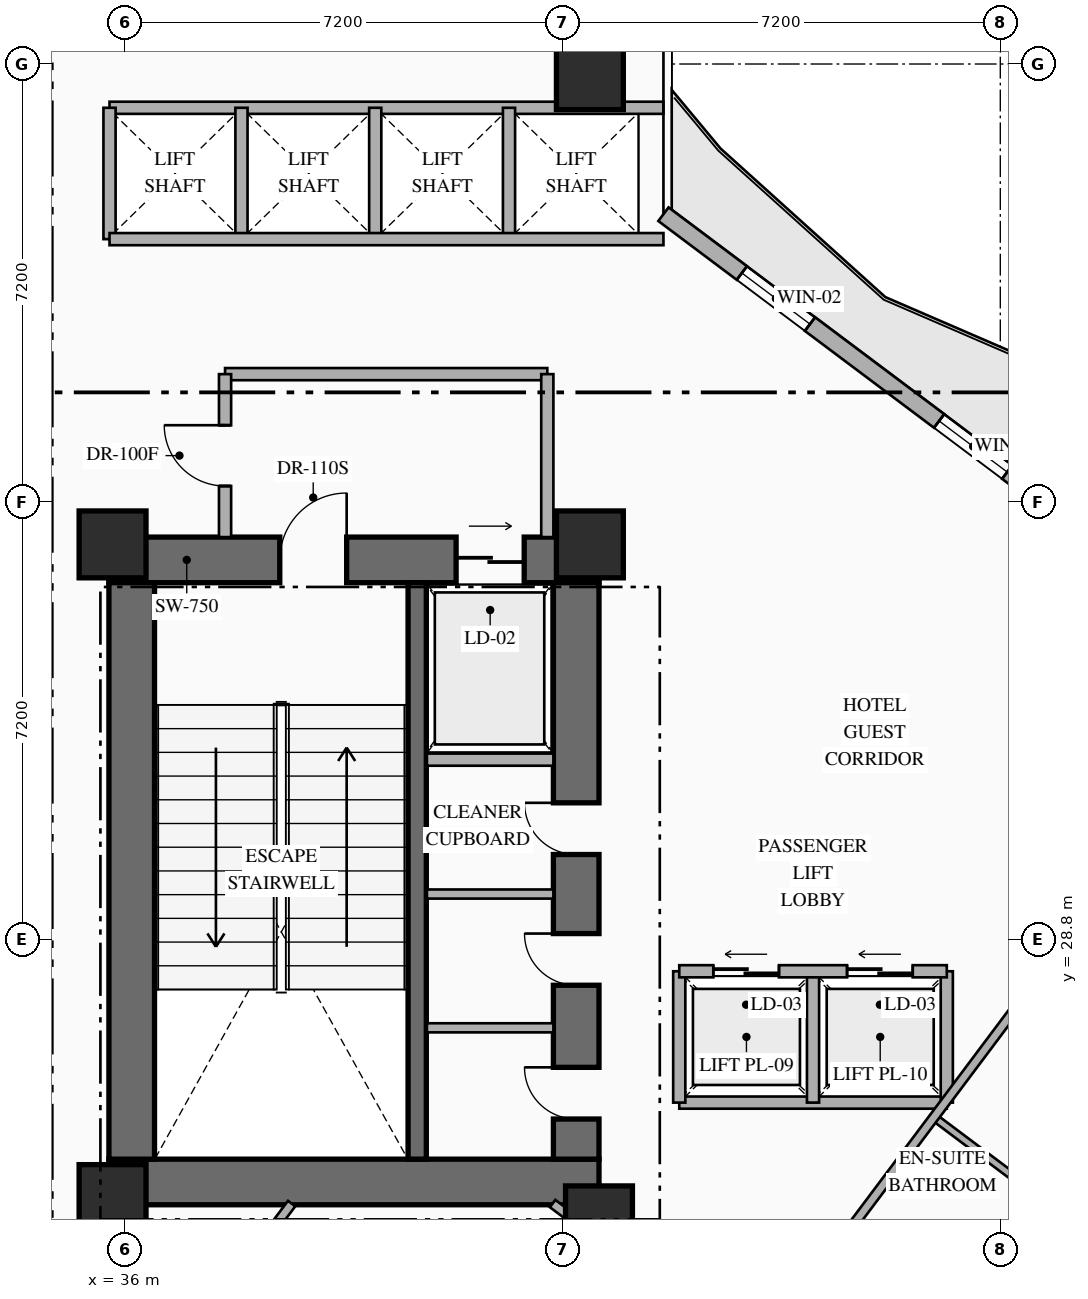
"""IFC4 building model, lengths in metres.
Left out: names, types, materials, properties, quantities, classifications, styles, units other than length and angle.
Written with IfcOpenShell. Run it as: python <this file> out.ifc"""

import sys

from ifc_helpers import new_model, si_unit, direction, frame, frame_2d, origin, origin_2d, place, context, subcontext, project, spatial, rectangle, extrude, element, fill, save


model = new_model("IFC4")
c1 = context("Model", 3, precision=1e-05, world=origin(), true_north=direction((0.0, 1.0)))
c2 = subcontext(c1, "Body", "Model", "MODEL_VIEW")
j1 = project(units=[si_unit("LENGTHUNIT", "METRE"), si_unit("PLANEANGLEUNIT", "RADIAN")], contexts=[c1])
p1 = place(None, origin())
s1 = spatial("IfcSite", under=j1, at=p1, CompositionType="ELEMENT")
p2 = place(p1, origin())
s2 = spatial("IfcBuilding", under=s1, at=p2, CompositionType="ELEMENT")
p3 = place(p2, frame((0.0, 0.0, 70.1)))
s3 = spatial("IfcBuildingStorey", under=s2, at=p3, CompositionType="ELEMENT", Elevation=70.1)
p4 = place(p3, frame((35.74, 24.815, 0.0), z_axis=(0.0, 0.0, 1.0), x_axis=(1.0, 0.0, 0.0)))
e1 = element("IfcWall", 1, at=p4, inside=s3, PredefinedType="SHEAR", context=c2, shape_type="SweptSolid", body=[
    extrude(rectangle(XDim=8.06, YDim=0.75, at=frame_2d((4.03, 0.0))), origin(), (0.0, 0.0, 1.0), 4.5),
])
p5 = place(p3, frame((35.74, 35.045, 0.0), z_axis=(0.0, 0.0, 1.0), x_axis=(1.0, 0.0, 0.0)))
e2 = element("IfcWall", 2, at=p5, inside=s3, PredefinedType="SHEAR", context=c2, shape_type="SweptSolid", body=[
    extrude(rectangle(XDim=8.06, YDim=0.75, at=frame_2d((4.03, 0.0))), origin(), (0.0, 0.0, 1.0), 4.5),
])
p6 = place(p5, frame((2.81, 0.0, 0.0)))
e3 = element("IfcOpeningElement", 3, at=p6, cuts=e2, PredefinedType="OPENING", context=c2, shape_type="SweptSolid", body=[
    extrude(rectangle(XDim=1.1, YDim=2.2, at=frame_2d((0.55, 1.1))), frame((0.0, 0.385, 0.0), z_axis=(0.0, -1.0, 0.0), x_axis=(1.0, 0.0, 0.0)), (0.0, 0.0, 1.0), 0.77),
])
p7 = place(p5, frame((5.71, 0.0, 0.0)))
e4 = element("IfcOpeningElement", 4, at=p7, cuts=e2, PredefinedType="OPENING", context=c2, shape_type="SweptSolid", body=[
    extrude(rectangle(XDim=1.12, YDim=2.15, at=frame_2d((0.56, 1.075))), frame((0.0, 0.385, 0.0), z_axis=(0.0, -1.0, 0.0), x_axis=(1.0, 0.0, 0.0)), (0.0, 0.0, 1.0), 0.77),
])
p8 = place(p3, frame((36.115, 25.19, 0.0), z_axis=(0.0, 0.0, 1.0), x_axis=(0.0, 1.0, 0.0)))
e5 = element("IfcWall", 5, at=p8, inside=s3, PredefinedType="SHEAR", context=c2, shape_type="SweptSolid", body=[
    extrude(rectangle(XDim=9.48, YDim=0.75, at=frame_2d((4.74, 0.0))), origin(), (0.0, 0.0, 1.0), 4.5),
])
p9 = place(p3, frame((43.425, 25.19, 0.0), z_axis=(0.0, 0.0, 1.0), x_axis=(0.0, 1.0, 0.0)))
e6 = element("IfcWall", 6, at=p9, inside=s3, PredefinedType="SHEAR", context=c2, shape_type="SweptSolid", body=[
    extrude(rectangle(XDim=9.48, YDim=0.75, at=frame_2d((4.74, 0.0))), origin(), (0.0, 0.0, 1.0), 4.5),
])
p10 = place(p9, frame((0.66, 0.0, 0.0)))
e7 = element("IfcOpeningElement", 7, at=p10, cuts=e6, PredefinedType="OPENING", context=c2, shape_type="SweptSolid", body=[
    extrude(rectangle(XDim=0.85, YDim=2.08, at=frame_2d((0.425, 1.04))), frame((0.0, 0.385, 0.0), z_axis=(0.0, -1.0, 0.0), x_axis=(1.0, 0.0, 0.0)), (0.0, 0.0, 1.0), 0.77),
])
p11 = place(p9, frame((2.86, 0.0, 0.0)))
e8 = element("IfcOpeningElement", 8, at=p11, cuts=e6, PredefinedType="OPENING", context=c2, shape_type="SweptSolid", body=[
    extrude(rectangle(XDim=0.85, YDim=2.08, at=frame_2d((0.425, 1.04))), frame((0.0, 0.385, 0.0), z_axis=(0.0, -1.0, 0.0), x_axis=(1.0, 0.0, 0.0)), (0.0, 0.0, 1.0), 0.77),
])
p12 = place(p9, frame((5.01, 0.0, 0.0)))
e9 = element("IfcOpeningElement", 9, at=p12, cuts=e6, PredefinedType="OPENING", context=c2, shape_type="SweptSolid", body=[
    extrude(rectangle(XDim=0.85, YDim=2.08, at=frame_2d((0.425, 1.04))), frame((0.0, 0.385, 0.0), z_axis=(0.0, -1.0, 0.0), x_axis=(1.0, 0.0, 0.0)), (0.0, 0.0, 1.0), 0.77),
])
p13 = place(p3, frame((40.81, 25.19, 0.0), z_axis=(0.0, 0.0, 1.0), x_axis=(0.0, 1.0, 0.0)))
e10 = element("IfcWall", 10, at=p13, inside=s3, PredefinedType="SHEAR", context=c2, shape_type="SweptSolid", body=[
    extrude(rectangle(XDim=9.48, YDim=0.3, at=frame_2d((4.74, 0.0))), origin(), (0.0, 0.0, 1.0), 4.5),
])
for number, where, z_axis, x_axis in (
    (11, (35.8, 24.55, 0.0), (0.0, 0.0, 1.0), (1.0, 0.0, 0.0)),
    (12, (43.8, 24.2, 0.0), (0.0, 0.0, 1.0), (1.0, 0.0, 0.0)),
    (13, (35.8, 35.3, 0.0), (0.0, 0.0, 1.0), (1.0, 0.0, 0.0)),
    (14, (43.65, 35.3, 0.0), (0.0, 0.0, 1.0), (1.0, 0.0, 0.0)),
    (15, (43.65, 43.0, 0.0), (0.0, 0.0, 1.0), (1.0, 0.0, 0.0)),
):
    element("IfcColumn", number, at=place(p3, frame(where, z_axis=z_axis, x_axis=x_axis)), inside=s3, PredefinedType="COLUMN", context=c2, shape_type="SweptSolid", body=[
        extrude(rectangle(XDim=1.1, YDim=1.1, at=origin_2d()), origin(), (0.0, 0.0, 1.0), 4.5),
    ])
p14 = place(p3, frame((44.86, 40.73, 0.0), z_axis=(0.0, 0.0, 1.0), x_axis=(0.800006902154, -0.599990797017, 0.0)))
e16 = element("IfcWall", 16, at=p14, inside=s3, PredefinedType="STANDARD", context=c2, shape_type="SweptSolid", body=[
    extrude(rectangle(XDim=29.712, YDim=0.28, at=frame_2d((14.856, 0.0))), origin(), (0.0, 0.0, 1.0), 4.28),
])
p15 = place(p14, frame((14.249, 0.0, 0.0)))
e17 = element("IfcOpeningElement", 17, at=p15, cuts=e16, PredefinedType="OPENING", context=c2, shape_type="SweptSolid", body=[
    extrude(rectangle(XDim=1.1, YDim=2.2, at=frame_2d((0.55, 1.1))), frame((0.0, 0.15, 0.0), z_axis=(0.0, -1.0, 0.0), x_axis=(1.0, 0.0, 0.0)), (0.0, 0.0, 1.0), 0.3),
])
p16 = place(p14, frame((1.612, 0.0, 0.85)))
e18 = element("IfcOpeningElement", 18, at=p16, cuts=e16, PredefinedType="OPENING", context=c2, shape_type="SweptSolid", body=[
    extrude(rectangle(XDim=1.4, YDim=1.8, at=frame_2d((0.7, 0.9))), frame((0.0, 0.15, 0.0), z_axis=(0.0, -1.0, 0.0), x_axis=(1.0, 0.0, 0.0)), (0.0, 0.0, 1.0), 0.3),
])
p17 = place(p14, frame((5.667, 0.0, 0.85)))
e19 = element("IfcOpeningElement", 19, at=p17, cuts=e16, PredefinedType="OPENING", context=c2, shape_type="SweptSolid", body=[
    extrude(rectangle(XDim=1.4, YDim=1.8, at=frame_2d((0.7, 0.9))), frame((0.0, 0.15, 0.0), z_axis=(0.0, -1.0, 0.0), x_axis=(1.0, 0.0, 0.0)), (0.0, 0.0, 1.0), 0.3),
])
p18 = place(p14, frame((9.912, 0.0, 0.85)))
e20 = element("IfcOpeningElement", 20, at=p18, cuts=e16, PredefinedType="OPENING", context=c2, shape_type="SweptSolid", body=[
    extrude(rectangle(XDim=1.4, YDim=1.8, at=frame_2d((0.7, 0.9))), frame((0.0, 0.15, 0.0), z_axis=(0.0, -1.0, 0.0), x_axis=(1.0, 0.0, 0.0)), (0.0, 0.0, 1.0), 0.3),
])
p19 = place(p14, frame((19.743, 0.0, 0.85)))
e21 = element("IfcOpeningElement", 21, at=p19, cuts=e16, PredefinedType="OPENING", context=c2, shape_type="SweptSolid", body=[
    extrude(rectangle(XDim=1.4, YDim=1.8, at=frame_2d((0.7, 0.9))), frame((0.0, 0.15, 0.0), z_axis=(0.0, -1.0, 0.0), x_axis=(1.0, 0.0, 0.0)), (0.0, 0.0, 1.0), 0.3),
])
p20 = place(p14, frame((22.645, 0.0, 0.85)))
e22 = element("IfcOpeningElement", 22, at=p20, cuts=e16, PredefinedType="OPENING", context=c2, shape_type="SweptSolid", body=[
    extrude(rectangle(XDim=1.4, YDim=1.8, at=frame_2d((0.7, 0.9))), frame((0.0, 0.15, 0.0), z_axis=(0.0, -1.0, 0.0), x_axis=(1.0, 0.0, 0.0)), (0.0, 0.0, 1.0), 0.3),
])
p21 = place(p14, frame((26.354, 0.0, 0.85)))
e23 = element("IfcOpeningElement", 23, at=p21, cuts=e16, PredefinedType="OPENING", context=c2, shape_type="SweptSolid", body=[
    extrude(rectangle(XDim=1.4, YDim=1.8, at=frame_2d((0.7, 0.9))), frame((0.0, 0.15, 0.0), z_axis=(0.0, -1.0, 0.0), x_axis=(1.0, 0.0, 0.0)), (0.0, 0.0, 1.0), 0.3),
])
p22 = place(p3, frame((40.97, 31.76, 0.0), z_axis=(0.0, 0.0, 1.0), x_axis=(1.0, 0.0, 0.0)))
e24 = element("IfcWall", 24, at=p22, inside=s3, PredefinedType="STANDARD", context=c2, shape_type="SweptSolid", body=[
    extrude(rectangle(XDim=2.08, YDim=0.2, at=frame_2d((1.04, 0.0))), origin(), (0.0, 0.0, 1.0), 4.28),
])
for number, where, z_axis, x_axis in (
    (25, (40.97, 27.35, 0.0), (0.0, 0.0, 1.0), (1.0, 0.0, 0.0)),
    (26, (40.97, 29.55, 0.0), (0.0, 0.0, 1.0), (1.0, 0.0, 0.0)),
):
    element("IfcWall", number, at=place(p3, frame(where, z_axis=z_axis, x_axis=x_axis)), inside=s3, PredefinedType="PARTITIONING", context=c2, shape_type="SweptSolid", body=[
        extrude(rectangle(XDim=2.08, YDim=0.15, at=frame_2d((1.04, 0.0))), origin(), (0.0, 0.0, 1.0), 4.28),
    ])
p23 = place(p3, frame((37.65, 38.1, 0.0), z_axis=(0.0, 0.0, 1.0), x_axis=(1.0, 0.0, 0.0)))
e27 = element("IfcWall", 27, at=p23, inside=s3, PredefinedType="STANDARD", context=c2, shape_type="SweptSolid", body=[
    extrude(rectangle(XDim=5.3, YDim=0.2, at=frame_2d((2.65, 0.0))), origin(), (0.0, 0.0, 1.0), 4.28),
])
p24 = place(p3, frame((42.95, 35.42, 0.0), z_axis=(0.0, 0.0, 1.0), x_axis=(0.0, 1.0, 0.0)))
e28 = element("IfcWall", 28, at=p24, inside=s3, PredefinedType="STANDARD", context=c2, shape_type="SweptSolid", body=[
    extrude(rectangle(XDim=2.68, YDim=0.2, at=frame_2d((1.34, 0.0))), origin(), (0.0, 0.0, 1.0), 4.28),
])
p25 = place(p3, frame((37.65, 35.42, 0.0), z_axis=(0.0, 0.0, 1.0), x_axis=(0.0, 1.0, 0.0)))
e29 = element("IfcWall", 29, at=p25, inside=s3, PredefinedType="STANDARD", context=c2, shape_type="SweptSolid", body=[
    extrude(rectangle(XDim=2.68, YDim=0.2, at=frame_2d((1.34, 0.0))), origin(), (0.0, 0.0, 1.0), 4.28),
])
p26 = place(p25, frame((0.84, 0.0, 0.0)))
e30 = element("IfcOpeningElement", 30, at=p26, cuts=e29, PredefinedType="OPENING", context=c2, shape_type="SweptSolid", body=[
    extrude(rectangle(XDim=1.0, YDim=2.2, at=frame_2d((0.5, 1.1))), frame((0.0, 0.11, 0.0), z_axis=(0.0, -1.0, 0.0), x_axis=(1.0, 0.0, 0.0)), (0.0, 0.0, 1.0), 0.22),
])
p27 = place(p3, frame((35.75, 42.48, 0.0), z_axis=(0.0, 0.0, 1.0), x_axis=(1.0, 0.0, 0.0)))
e31 = element("IfcWall", 31, at=p27, inside=s3, PredefinedType="STANDARD", context=c2, shape_type="SweptSolid", body=[
    extrude(rectangle(XDim=9.11, YDim=0.2, at=frame_2d((4.555, 0.0))), origin(), (0.0, 0.0, 1.0), 4.28),
])
for number, where, z_axis, x_axis in (
    (32, (35.75, 40.32, 0.0), (0.0, 0.0, 1.0), (0.0, 1.0, 0.0)),
    (33, (37.92, 40.32, 0.0), (0.0, 0.0, 1.0), (0.0, 1.0, 0.0)),
    (34, (40.12, 40.32, 0.0), (0.0, 0.0, 1.0), (0.0, 1.0, 0.0)),
    (35, (42.32, 40.32, 0.0), (0.0, 0.0, 1.0), (0.0, 1.0, 0.0)),
):
    element("IfcWall", number, at=place(p3, frame(where, z_axis=z_axis, x_axis=x_axis)), inside=s3, PredefinedType="STANDARD", context=c2, shape_type="SweptSolid", body=[
        extrude(rectangle(XDim=2.16, YDim=0.2, at=frame_2d((1.08, 0.0))), origin(), (0.0, 0.0, 1.0), 4.28),
    ])
p28 = place(p3, frame((35.75, 40.32, 0.0), z_axis=(0.0, 0.0, 1.0), x_axis=(1.0, 0.0, 0.0)))
e36 = element("IfcWall", 36, at=p28, inside=s3, PredefinedType="STANDARD", context=c2, shape_type="SweptSolid", body=[
    extrude(rectangle(XDim=9.11, YDim=0.2, at=frame_2d((4.555, 0.0))), origin(), (0.0, 0.0, 1.0), 4.28),
])
p29 = place(p3, frame((45.12, 26.12, 0.0), z_axis=(0.0, 0.0, 1.0), x_axis=(1.0, 0.0, 0.0)))
e37 = element("IfcWall", 37, at=p29, inside=s3, PredefinedType="STANDARD", context=c2, shape_type="SweptSolid", body=[
    extrude(rectangle(XDim=4.4, YDim=0.2, at=frame_2d((2.2, 0.0))), origin(), (0.0, 0.0, 1.0), 4.28),
])
for number, where, z_axis, x_axis in (
    (38, (45.12, 26.12, 0.0), (0.0, 0.0, 1.0), (0.0, 1.0, 0.0)),
    (39, (49.52, 26.12, 0.0), (0.0, 0.0, 1.0), (0.0, 1.0, 0.0)),
    (40, (47.32, 26.12, 0.0), (0.0, 0.0, 1.0), (0.0, 1.0, 0.0)),
):
    element("IfcWall", number, at=place(p3, frame(where, z_axis=z_axis, x_axis=x_axis)), inside=s3, PredefinedType="STANDARD", context=c2, shape_type="SweptSolid", body=[
        extrude(rectangle(XDim=2.16, YDim=0.2, at=frame_2d((1.08, 0.0))), origin(), (0.0, 0.0, 1.0), 4.28),
    ])
p30 = place(p3, frame((45.12, 28.28, 0.0), z_axis=(0.0, 0.0, 1.0), x_axis=(1.0, 0.0, 0.0)))
e41 = element("IfcWall", 41, at=p30, inside=s3, PredefinedType="STANDARD", context=c2, shape_type="SweptSolid", body=[
    extrude(rectangle(XDim=4.4, YDim=0.2, at=frame_2d((2.2, 0.0))), origin(), (0.0, 0.0, 1.0), 4.28),
])
p31 = place(p30, frame((0.56, 0.0, 0.0)))
e42 = element("IfcOpeningElement", 42, at=p31, cuts=e41, PredefinedType="OPENING", context=c2, shape_type="SweptSolid", body=[
    extrude(rectangle(XDim=1.08, YDim=2.15, at=frame_2d((0.54, 1.075))), frame((0.0, 0.11, 0.0), z_axis=(0.0, -1.0, 0.0), x_axis=(1.0, 0.0, 0.0)), (0.0, 0.0, 1.0), 0.22),
])
p32 = place(p30, frame((2.76, 0.0, 0.0)))
e43 = element("IfcOpeningElement", 43, at=p32, cuts=e41, PredefinedType="OPENING", context=c2, shape_type="SweptSolid", body=[
    extrude(rectangle(XDim=1.08, YDim=2.15, at=frame_2d((0.54, 1.075))), frame((0.0, 0.11, 0.0), z_axis=(0.0, -1.0, 0.0), x_axis=(1.0, 0.0, 0.0)), (0.0, 0.0, 1.0), 0.22),
])
p33 = place(p3, frame((43.037, 24.46, 0.0), z_axis=(0.0, 0.0, 1.0), x_axis=(0.799971872363, -0.600037501685, 0.0)))
e44 = element("IfcWall", 44, at=p33, inside=s3, PredefinedType="PARTITIONING", context=c2, shape_type="SweptSolid", body=[
    extrude(rectangle(XDim=4.167, YDim=0.15, at=frame_2d((2.083, 0.0))), origin(), (0.0, 0.0, 1.0), 3.475),
])
p34 = place(p33, frame((2.468, 0.0, 0.0)))
e45 = element("IfcOpeningElement", 45, at=p34, cuts=e44, PredefinedType="OPENING", context=c2, shape_type="SweptSolid", body=[
    extrude(rectangle(XDim=0.95, YDim=2.15, at=frame_2d((0.475, 1.075))), frame((0.0, 0.085, 0.0), z_axis=(0.0, -1.0, 0.0), x_axis=(1.0, 0.0, 0.0)), (0.0, 0.0, 1.0), 0.17),
])
p35 = place(p3, frame((33.384, 17.312, 0.0), z_axis=(0.0, 0.0, 1.0), x_axis=(0.600008743659, 0.799993442181, 0.0)))
e46 = element("IfcWall", 46, at=p35, inside=s3, PredefinedType="PARTITIONING", context=c2, shape_type="SweptSolid", body=[
    extrude(rectangle(XDim=8.935, YDim=0.15, at=frame_2d((4.468, 0.0))), origin(), (0.0, 0.0, 1.0), 4.28),
])
p36 = place(p3, frame((49.59, 22.67, 0.0), z_axis=(0.0, 0.0, 1.0), x_axis=(0.599951172744, 0.800036618114, 0.0)))
e47 = element("IfcWall", 47, at=p36, inside=s3, PredefinedType="PARTITIONING", context=c2, shape_type="SweptSolid", body=[
    extrude(rectangle(XDim=2.4, YDim=0.12, at=frame_2d((1.2, 0.0))), origin(), (0.0, 0.0, 1.0), 4.28),
])
p37 = place(p36, frame((0.8, 0.0, 0.0)))
e48 = element("IfcOpeningElement", 48, at=p37, cuts=e47, PredefinedType="OPENING", context=c2, shape_type="SweptSolid", body=[
    extrude(rectangle(XDim=0.8, YDim=2.06, at=frame_2d((0.4, 1.03))), frame((0.0, 0.07, 0.0), z_axis=(0.0, -1.0, 0.0), x_axis=(1.0, 0.0, 0.0)), (0.0, 0.0, 1.0), 0.14),
])
p38 = place(p3, frame((49.31, 25.88, 0.0), z_axis=(0.0, 0.0, 1.0), x_axis=(0.800040880289, -0.59994548908, 0.0)))
e49 = element("IfcWall", 49, at=p38, inside=s3, PredefinedType="PARTITIONING", context=c2, shape_type="SweptSolid", body=[
    extrude(rectangle(XDim=2.15, YDim=0.12, at=frame_2d((1.075, 0.0))), origin(), (0.0, 0.0, 1.0), 4.28),
])
p39 = place(p3, frame((47.87, 23.96, 0.0), z_axis=(0.0, 0.0, 1.0), x_axis=(0.599996617946, 0.80000253653, 0.0)))
e50 = element("IfcWall", 50, at=p39, inside=s3, PredefinedType="PARTITIONING", context=c2, shape_type="SweptSolid", body=[
    extrude(rectangle(XDim=11.55, YDim=0.15, at=frame_2d((5.775, 0.0))), origin(), (0.0, 0.0, 1.0), 4.28),
])
p40 = place(p16, origin())
e51 = element("IfcWindow", 51, at=p40, inside=s3, PartitioningType="SINGLE_PANEL", PredefinedType="WINDOW", context=c2, shape_type="SweptSolid", body=[
    extrude(rectangle(XDim=1.4, YDim=1.8, at=frame_2d((0.7, 0.9))), frame((0.0, 0.03, 0.0), z_axis=(0.0, -1.0, 0.0), x_axis=(1.0, 0.0, 0.0)), (0.0, 0.0, 1.0), 0.06),
])
fill(e18, e51)
p41 = place(p17, origin())
e52 = element("IfcWindow", 52, at=p41, inside=s3, PartitioningType="SINGLE_PANEL", PredefinedType="WINDOW", context=c2, shape_type="SweptSolid", body=[
    extrude(rectangle(XDim=1.4, YDim=1.8, at=frame_2d((0.7, 0.9))), frame((0.0, 0.03, 0.0), z_axis=(0.0, -1.0, 0.0), x_axis=(1.0, 0.0, 0.0)), (0.0, 0.0, 1.0), 0.06),
])
fill(e19, e52)
p42 = place(p6, origin())
e53 = element("IfcDoor", 53, at=p42, inside=s3, OperationType="SINGLE_SWING_RIGHT", PredefinedType="DOOR", context=c2, shape_type="SweptSolid", body=[
    extrude(rectangle(XDim=1.1, YDim=2.2, at=frame_2d((0.55, 1.1))), frame((0.0, 0.025, 0.0), z_axis=(0.0, -1.0, 0.0), x_axis=(1.0, 0.0, 0.0)), (0.0, 0.0, 1.0), 0.05),
])
fill(e3, e53)
p43 = place(p7, origin())
e54 = element("IfcDoor", 54, at=p43, inside=s3, OperationType="SLIDING_TO_RIGHT", PredefinedType="USERDEFINED", context=c2, shape_type="SweptSolid", body=[
    extrude(rectangle(XDim=1.12, YDim=2.15, at=frame_2d((0.56, 1.075))), frame((0.0, 0.025, 0.0), z_axis=(0.0, -1.0, 0.0), x_axis=(1.0, 0.0, 0.0)), (0.0, 0.0, 1.0), 0.05),
])
fill(e4, e54)
p44 = place(p10, origin())
e55 = element("IfcDoor", 55, at=p44, inside=s3, OperationType="SINGLE_SWING_RIGHT", PredefinedType="DOOR", context=c2, shape_type="SweptSolid", body=[
    extrude(rectangle(XDim=0.85, YDim=2.08, at=frame_2d((0.425, 1.04))), frame((0.0, 0.025, 0.0), z_axis=(0.0, -1.0, 0.0), x_axis=(1.0, 0.0, 0.0)), (0.0, 0.0, 1.0), 0.05),
])
fill(e7, e55)
p45 = place(p11, origin())
e56 = element("IfcDoor", 56, at=p45, inside=s3, OperationType="SINGLE_SWING_RIGHT", PredefinedType="DOOR", context=c2, shape_type="SweptSolid", body=[
    extrude(rectangle(XDim=0.85, YDim=2.08, at=frame_2d((0.425, 1.04))), frame((0.0, 0.025, 0.0), z_axis=(0.0, -1.0, 0.0), x_axis=(1.0, 0.0, 0.0)), (0.0, 0.0, 1.0), 0.05),
])
fill(e8, e56)
p46 = place(p12, origin())
e57 = element("IfcDoor", 57, at=p46, inside=s3, OperationType="SINGLE_SWING_RIGHT", PredefinedType="DOOR", context=c2, shape_type="SweptSolid", body=[
    extrude(rectangle(XDim=0.85, YDim=2.08, at=frame_2d((0.425, 1.04))), frame((0.0, 0.025, 0.0), z_axis=(0.0, -1.0, 0.0), x_axis=(1.0, 0.0, 0.0)), (0.0, 0.0, 1.0), 0.05),
])
fill(e9, e57)
p47 = place(p26, origin())
e58 = element("IfcDoor", 58, at=p47, inside=s3, OperationType="SINGLE_SWING_RIGHT", PredefinedType="DOOR", context=c2, shape_type="SweptSolid", body=[
    extrude(rectangle(XDim=1.0, YDim=2.2, at=frame_2d((0.5, 1.1))), frame((0.0, 0.025, 0.0), z_axis=(0.0, -1.0, 0.0), x_axis=(1.0, 0.0, 0.0)), (0.0, 0.0, 1.0), 0.05),
])
fill(e30, e58)
p48 = place(p31, origin())
e59 = element("IfcDoor", 59, at=p48, inside=s3, OperationType="SLIDING_TO_LEFT", PredefinedType="USERDEFINED", context=c2, shape_type="SweptSolid", body=[
    extrude(rectangle(XDim=1.08, YDim=2.15, at=frame_2d((0.54, 1.075))), frame((0.0, 0.025, 0.0), z_axis=(0.0, -1.0, 0.0), x_axis=(1.0, 0.0, 0.0)), (0.0, 0.0, 1.0), 0.05),
])
fill(e42, e59)
p49 = place(p32, origin())
e60 = element("IfcDoor", 60, at=p49, inside=s3, OperationType="SLIDING_TO_LEFT", PredefinedType="USERDEFINED", context=c2, shape_type="SweptSolid", body=[
    extrude(rectangle(XDim=1.08, YDim=2.15, at=frame_2d((0.54, 1.075))), frame((0.0, 0.025, 0.0), z_axis=(0.0, -1.0, 0.0), x_axis=(1.0, 0.0, 0.0)), (0.0, 0.0, 1.0), 0.05),
])
fill(e43, e60)
save(model, sys.argv[1])
